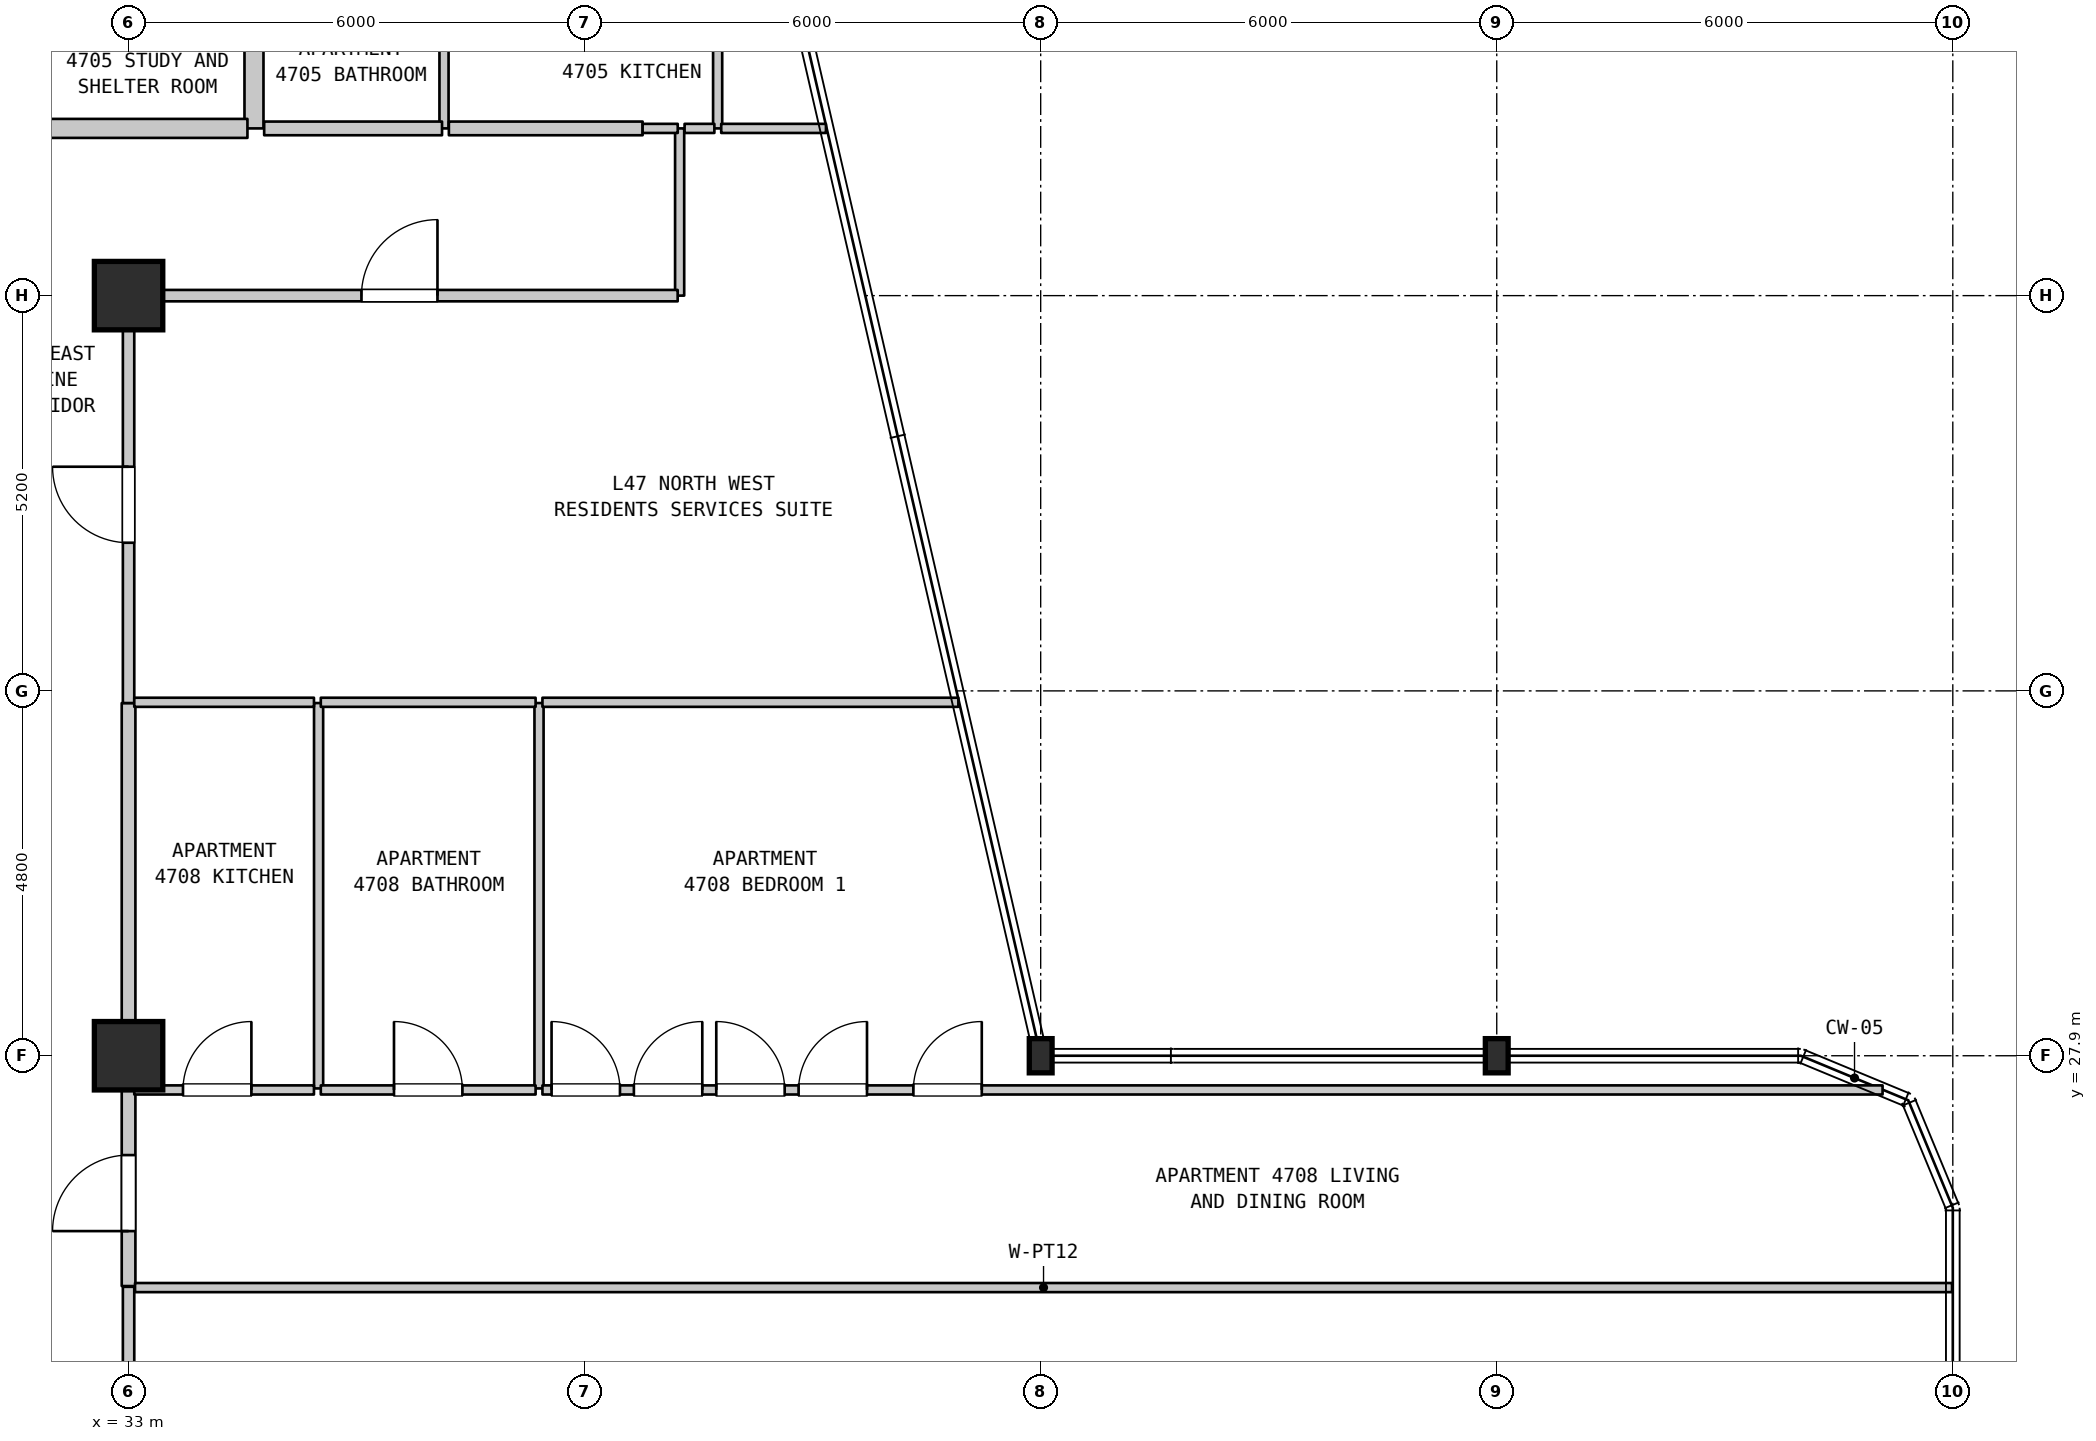
"""IFC4 building model, lengths in metres.
Left out: names, types, materials, properties, quantities, classifications, styles, units other than length and angle.
Written with IfcOpenShell. Run it as: python <this file> out.ifc"""

import sys

from ifc_helpers import new_model, si_unit, direction, frame, frame_2d, origin, origin_2d, place, context, subcontext, project, spatial, rectangle, i_section, extrude, element, fill, save


model = new_model("IFC4")
c1 = context("Model", 3, precision=1e-05, world=origin(), true_north=direction((0.0, 1.0)))
c2 = subcontext(c1, "Body", "Model", "MODEL_VIEW")
j1 = project(units=[si_unit("LENGTHUNIT", "METRE"), si_unit("PLANEANGLEUNIT", "RADIAN")], contexts=[c1])
p1 = place(None, origin())
s1 = spatial("IfcSite", under=j1, at=p1, CompositionType="ELEMENT")
p2 = place(p1, origin())
s2 = spatial("IfcBuilding", under=s1, at=p2, CompositionType="ELEMENT")
p3 = place(p2, frame((0.0, 0.0, 192.1)))
s3 = spatial("IfcBuildingStorey", under=s2, at=p3, CompositionType="ELEMENT", Elevation=192.1)
for number, where, z_axis, x_axis in (
    (1, (33.0, 27.9, 0.0), (0.0, 0.0, 1.0), (1.0, 0.0, 0.0)),
    (2, (33.0, 37.9, 0.0), (0.0, 0.0, 1.0), (1.0, 0.0, 0.0)),
):
    element("IfcColumn", number, at=place(p3, frame(where, z_axis=z_axis, x_axis=x_axis)), inside=s3, PredefinedType="COLUMN", context=c2, shape_type="SweptSolid", body=[
        extrude(rectangle(XDim=0.9, YDim=0.9, at=origin_2d()), origin(), (0.0, 0.0, 1.0), 3.7),
    ])
for number, where, z_axis, x_axis in (
    (3, (45.0, 27.9, 0.0), (0.0, 0.0, 1.0), (1.0, 0.0, 0.0)),
    (4, (51.0, 27.9, 0.0), (0.0, 0.0, 1.0), (1.0, 0.0, 0.0)),
):
    element("IfcColumn", number, at=place(p3, frame(where, z_axis=z_axis, x_axis=x_axis)), inside=s3, PredefinedType="COLUMN", context=c2, shape_type="SweptSolid", body=[
        extrude(i_section(OverallWidth=0.3, OverallDepth=0.45, WebThickness=0.014, FlangeThickness=0.026, FilletRadius=0.027, at=origin_2d()), origin(), (0.0, 0.0, 1.0), 3.7),
    ])
p4 = place(p3, frame((33.0, 19.51, 0.0), z_axis=(0.0, 0.0, 1.0), x_axis=(0.0, 1.0, 0.0)))
e5 = element("IfcWall", 5, at=p4, inside=s3, PredefinedType="STANDARD", context=c2, shape_type="SweptSolid", body=[
    extrude(rectangle(XDim=5.35, YDim=0.15, at=frame_2d((2.675, 0.0))), origin(), (0.0, 0.0, 1.0), 2.99),
])
p5 = place(p4, frame((1.534, 0.0, 0.0)))
e6 = element("IfcOpeningElement", 6, at=p5, cuts=e5, PredefinedType="OPENING", context=c2, shape_type="SweptSolid", body=[
    extrude(rectangle(XDim=1.0, YDim=2.15, at=frame_2d((0.5, 1.075))), frame((0.0, 0.085, 0.0), z_axis=(0.0, -1.0, 0.0), x_axis=(1.0, 0.0, 0.0)), (0.0, 0.0, 1.0), 0.17),
])
p6 = place(p3, frame((33.0, 24.87, 0.0), z_axis=(0.0, 0.0, 1.0), x_axis=(0.0, 1.0, 0.0)))
e7 = element("IfcWall", 7, at=p6, inside=s3, PredefinedType="STANDARD", context=c2, shape_type="SweptSolid", body=[
    extrude(rectangle(XDim=2.6, YDim=0.18, at=frame_2d((1.3, 0.0))), origin(), (0.0, 0.0, 1.0), 2.99),
])
p7 = place(p6, frame((0.723, 0.0, 0.0)))
e8 = element("IfcOpeningElement", 8, at=p7, cuts=e7, PredefinedType="OPENING", context=c2, shape_type="SweptSolid", body=[
    extrude(rectangle(XDim=1.0, YDim=2.15, at=frame_2d((0.5, 1.075))), frame((0.0, 0.1, 0.0), z_axis=(0.0, -1.0, 0.0), x_axis=(1.0, 0.0, 0.0)), (0.0, 0.0, 1.0), 0.2),
])
p8 = place(p3, frame((33.0, 27.47, 0.0), z_axis=(0.0, 0.0, 1.0), x_axis=(0.0, 1.0, 0.0)))
e9 = element("IfcWall", 9, at=p8, inside=s3, PredefinedType="STANDARD", context=c2, shape_type="SweptSolid", body=[
    extrude(rectangle(XDim=5.07, YDim=0.18, at=frame_2d((2.535, 0.0))), origin(), (0.0, 0.0, 1.0), 2.89),
])
p9 = place(p3, frame((33.0, 32.54, 0.0), z_axis=(0.0, 0.0, 1.0), x_axis=(0.0, 1.0, 0.0)))
e10 = element("IfcWall", 10, at=p9, inside=s3, PredefinedType="STANDARD", context=c2, shape_type="SweptSolid", body=[
    extrude(rectangle(XDim=5.36, YDim=0.15, at=frame_2d((2.68, 0.0))), origin(), (0.0, 0.0, 1.0), 2.89),
])
p10 = place(p9, frame((2.109, 0.0, 0.0)))
e11 = element("IfcOpeningElement", 11, at=p10, cuts=e10, PredefinedType="OPENING", context=c2, shape_type="SweptSolid", body=[
    extrude(rectangle(XDim=1.0, YDim=2.15, at=frame_2d((0.5, 1.075))), frame((0.0, 0.085, 0.0), z_axis=(0.0, -1.0, 0.0), x_axis=(1.0, 0.0, 0.0)), (0.0, 0.0, 1.0), 0.17),
])
p11 = place(p3, frame((34.65, 40.1, 0.0), z_axis=(0.0, 0.0, 1.0), x_axis=(0.0, 1.0, 0.0)))
e12 = element("IfcWall", 12, at=p11, inside=s3, PredefinedType="STANDARD", context=c2, shape_type="SweptSolid", body=[
    extrude(rectangle(XDim=2.3, YDim=0.25, at=frame_2d((1.15, 0.0))), origin(), (0.0, 0.0, 1.0), 3.39),
])
p12 = place(p3, frame((35.5, 27.47, 0.0), z_axis=(0.0, 0.0, 1.0), x_axis=(0.0, 1.0, 0.0)))
e13 = element("IfcWall", 13, at=p12, inside=s3, PredefinedType="PARTITIONING", context=c2, shape_type="SweptSolid", body=[
    extrude(rectangle(XDim=5.07, YDim=0.12, at=frame_2d((2.535, 0.0))), origin(), (0.0, 0.0, 1.0), 3.39),
])
p13 = place(p3, frame((37.15, 40.1, 0.0), z_axis=(0.0, 0.0, 1.0), x_axis=(0.0, 1.0, 0.0)))
e14 = element("IfcWall", 14, at=p13, inside=s3, PredefinedType="PARTITIONING", context=c2, shape_type="SweptSolid", body=[
    extrude(rectangle(XDim=2.3, YDim=0.12, at=frame_2d((1.15, 0.0))), origin(), (0.0, 0.0, 1.0), 3.39),
])
p14 = place(p3, frame((38.4, 27.47, 0.0), z_axis=(0.0, 0.0, 1.0), x_axis=(0.0, 1.0, 0.0)))
e15 = element("IfcWall", 15, at=p14, inside=s3, PredefinedType="PARTITIONING", context=c2, shape_type="SweptSolid", body=[
    extrude(rectangle(XDim=5.07, YDim=0.12, at=frame_2d((2.535, 0.0))), origin(), (0.0, 0.0, 1.0), 3.39),
])
p15 = place(p3, frame((40.25, 37.9, 0.0), z_axis=(0.0, 0.0, 1.0), x_axis=(0.0, 1.0, 0.0)))
e16 = element("IfcWall", 16, at=p15, inside=s3, PredefinedType="PARTITIONING", context=c2, shape_type="SweptSolid", body=[
    extrude(rectangle(XDim=2.2, YDim=0.12, at=frame_2d((1.1, 0.0))), origin(), (0.0, 0.0, 1.0), 3.39),
])
p16 = place(p3, frame((40.75, 40.1, 0.0), z_axis=(0.0, 0.0, 1.0), x_axis=(0.0, 1.0, 0.0)))
e17 = element("IfcWall", 17, at=p16, inside=s3, PredefinedType="PARTITIONING", context=c2, shape_type="SweptSolid", body=[
    extrude(rectangle(XDim=2.3, YDim=0.12, at=frame_2d((1.15, 0.0))), origin(), (0.0, 0.0, 1.0), 3.39),
])
p17 = place(p3, frame((33.085, 24.85, 0.0), z_axis=(0.0, 0.0, 1.0), x_axis=(1.0, 0.0, 0.0)))
e18 = element("IfcWall", 18, at=p17, inside=s3, PredefinedType="PARTITIONING", context=c2, shape_type="SweptSolid", body=[
    extrude(rectangle(XDim=23.905, YDim=0.12, at=frame_2d((11.953, 0.0))), origin(), (0.0, 0.0, 1.0), 3.39),
])
p18 = place(p3, frame((33.075, 27.45, 0.0), z_axis=(0.0, 0.0, 1.0), x_axis=(1.0, 0.0, 0.0)))
e19 = element("IfcWall", 19, at=p18, inside=s3, PredefinedType="PARTITIONING", context=c2, shape_type="SweptSolid", body=[
    extrude(rectangle(XDim=2.364, YDim=0.12, at=frame_2d((1.182, 0.0))), origin(), (0.0, 0.0, 1.0), 3.39),
])
p19 = place(p18, frame((0.641, 0.0, 0.0)))
e20 = element("IfcOpeningElement", 20, at=p19, cuts=e19, PredefinedType="OPENING", context=c2, shape_type="SweptSolid", body=[
    extrude(rectangle(XDim=0.9, YDim=2.15, at=frame_2d((0.45, 1.075))), frame((0.0, 0.07, 0.0), z_axis=(0.0, -1.0, 0.0), x_axis=(1.0, 0.0, 0.0)), (0.0, 0.0, 1.0), 0.14),
])
p20 = place(p3, frame((35.529, 27.45, 0.0), z_axis=(0.0, 0.0, 1.0), x_axis=(1.0, 0.0, 0.0)))
e21 = element("IfcWall", 21, at=p20, inside=s3, PredefinedType="PARTITIONING", context=c2, shape_type="SweptSolid", body=[
    extrude(rectangle(XDim=2.826, YDim=0.12, at=frame_2d((1.413, 0.0))), origin(), (0.0, 0.0, 1.0), 3.39),
])
p21 = place(p20, frame((0.963, 0.0, 0.0)))
e22 = element("IfcOpeningElement", 22, at=p21, cuts=e21, PredefinedType="OPENING", context=c2, shape_type="SweptSolid", body=[
    extrude(rectangle(XDim=0.9, YDim=2.1, at=frame_2d((0.45, 1.05))), frame((0.0, 0.07, 0.0), z_axis=(0.0, -1.0, 0.0), x_axis=(1.0, 0.0, 0.0)), (0.0, 0.0, 1.0), 0.14),
])
p22 = place(p3, frame((38.445, 27.45, 0.0), z_axis=(0.0, 0.0, 1.0), x_axis=(1.0, 0.0, 0.0)))
e23 = element("IfcWall", 23, at=p22, inside=s3, PredefinedType="PARTITIONING", context=c2, shape_type="SweptSolid", body=[
    extrude(rectangle(XDim=17.631, YDim=0.12, at=frame_2d((8.815, 0.0))), origin(), (0.0, 0.0, 1.0), 3.39),
])
p23 = place(p22, frame((4.88, 0.0, 0.0)))
e24 = element("IfcOpeningElement", 24, at=p23, cuts=e23, PredefinedType="OPENING", context=c2, shape_type="SweptSolid", body=[
    extrude(rectangle(XDim=0.9, YDim=2.15, at=frame_2d((0.45, 1.075))), frame((0.0, 0.07, 0.0), z_axis=(0.0, -1.0, 0.0), x_axis=(1.0, 0.0, 0.0)), (0.0, 0.0, 1.0), 0.14),
])
p24 = place(p22, frame((0.12, 0.0, 0.0)))
e25 = element("IfcOpeningElement", 25, at=p24, cuts=e23, PredefinedType="OPENING", context=c2, shape_type="SweptSolid", body=[
    extrude(rectangle(XDim=0.9, YDim=2.15, at=frame_2d((0.45, 1.075))), frame((0.0, 0.07, 0.0), z_axis=(0.0, -1.0, 0.0), x_axis=(1.0, 0.0, 0.0)), (0.0, 0.0, 1.0), 0.14),
])
p25 = place(p22, frame((1.203, 0.0, 0.0)))
e26 = element("IfcOpeningElement", 26, at=p25, cuts=e23, PredefinedType="OPENING", context=c2, shape_type="SweptSolid", body=[
    extrude(rectangle(XDim=0.9, YDim=2.15, at=frame_2d((0.45, 1.075))), frame((0.0, 0.07, 0.0), z_axis=(0.0, -1.0, 0.0), x_axis=(1.0, 0.0, 0.0)), (0.0, 0.0, 1.0), 0.14),
])
p26 = place(p22, frame((2.287, 0.0, 0.0)))
e27 = element("IfcOpeningElement", 27, at=p26, cuts=e23, PredefinedType="OPENING", context=c2, shape_type="SweptSolid", body=[
    extrude(rectangle(XDim=0.9, YDim=2.15, at=frame_2d((0.45, 1.075))), frame((0.0, 0.07, 0.0), z_axis=(0.0, -1.0, 0.0), x_axis=(1.0, 0.0, 0.0)), (0.0, 0.0, 1.0), 0.14),
])
p27 = place(p22, frame((3.37, 0.0, 0.0)))
e28 = element("IfcOpeningElement", 28, at=p27, cuts=e23, PredefinedType="OPENING", context=c2, shape_type="SweptSolid", body=[
    extrude(rectangle(XDim=0.9, YDim=2.15, at=frame_2d((0.45, 1.075))), frame((0.0, 0.07, 0.0), z_axis=(0.0, -1.0, 0.0), x_axis=(1.0, 0.0, 0.0)), (0.0, 0.0, 1.0), 0.14),
])
p28 = place(p3, frame((33.075, 32.55, 0.0), z_axis=(0.0, 0.0, 1.0), x_axis=(1.0, 0.0, 0.0)))
e29 = element("IfcWall", 29, at=p28, inside=s3, PredefinedType="PARTITIONING", context=c2, shape_type="SweptSolid", body=[
    extrude(rectangle(XDim=2.364, YDim=0.12, at=frame_2d((1.182, 0.0))), origin(), (0.0, 0.0, 1.0), 3.39),
])
p29 = place(p3, frame((35.529, 32.55, 0.0), z_axis=(0.0, 0.0, 1.0), x_axis=(1.0, 0.0, 0.0)))
e30 = element("IfcWall", 30, at=p29, inside=s3, PredefinedType="PARTITIONING", context=c2, shape_type="SweptSolid", body=[
    extrude(rectangle(XDim=2.826, YDim=0.12, at=frame_2d((1.413, 0.0))), origin(), (0.0, 0.0, 1.0), 3.39),
])
p30 = place(p3, frame((38.445, 32.55, 0.0), z_axis=(0.0, 0.0, 1.0), x_axis=(1.0, 0.0, 0.0)))
e31 = element("IfcWall", 31, at=p30, inside=s3, PredefinedType="PARTITIONING", context=c2, shape_type="SweptSolid", body=[
    extrude(rectangle(XDim=5.472, YDim=0.12, at=frame_2d((2.736, 0.0))), origin(), (0.0, 0.0, 1.0), 3.39),
])
p31 = place(p3, frame((33.06, 37.9, 0.0), z_axis=(0.0, 0.0, 1.0), x_axis=(1.0, 0.0, 0.0)))
e32 = element("IfcWall", 32, at=p31, inside=s3, PredefinedType="STANDARD", context=c2, shape_type="SweptSolid", body=[
    extrude(rectangle(XDim=7.164, YDim=0.15, at=frame_2d((3.582, 0.0))), origin(), (0.0, 0.0, 1.0), 3.39),
])
p32 = place(p31, frame((3.004, 0.0, 0.0)))
e33 = element("IfcOpeningElement", 33, at=p32, cuts=e32, PredefinedType="OPENING", context=c2, shape_type="SweptSolid", body=[
    extrude(rectangle(XDim=1.0, YDim=2.15, at=frame_2d((0.5, 1.075))), frame((0.0, 0.085, 0.0), z_axis=(0.0, -1.0, 0.0), x_axis=(1.0, 0.0, 0.0)), (0.0, 0.0, 1.0), 0.17),
])
p33 = place(p3, frame((31.95, 40.1, 0.0), z_axis=(0.0, 0.0, 1.0), x_axis=(1.0, 0.0, 0.0)))
e34 = element("IfcWall", 34, at=p33, inside=s3, PredefinedType="STANDARD", context=c2, shape_type="SweptSolid", body=[
    extrude(rectangle(XDim=2.614, YDim=0.25, at=frame_2d((1.307, 0.0))), origin(), (0.0, 0.0, 1.0), 3.39),
])
p34 = place(p3, frame((34.784, 40.1, 0.0), z_axis=(0.0, 0.0, 1.0), x_axis=(1.0, 0.0, 0.0)))
e35 = element("IfcWall", 35, at=p34, inside=s3, PredefinedType="STANDARD", context=c2, shape_type="SweptSolid", body=[
    extrude(rectangle(XDim=2.34, YDim=0.18, at=frame_2d((1.17, 0.0))), origin(), (0.0, 0.0, 1.0), 3.39),
])
p35 = place(p3, frame((37.214, 40.1, 0.0), z_axis=(0.0, 0.0, 1.0), x_axis=(1.0, 0.0, 0.0)))
e36 = element("IfcWall", 36, at=p35, inside=s3, PredefinedType="STANDARD", context=c2, shape_type="SweptSolid", body=[
    extrude(rectangle(XDim=2.549, YDim=0.18, at=frame_2d((1.274, 0.0))), origin(), (0.0, 0.0, 1.0), 3.39),
])
p36 = place(p3, frame((39.763, 40.1, 0.0), z_axis=(0.0, 0.0, 1.0), x_axis=(1.0, 0.0, 0.0)))
e37 = element("IfcWall", 37, at=p36, inside=s3, PredefinedType="PARTITIONING", context=c2, shape_type="SweptSolid", body=[
    extrude(rectangle(XDim=0.462, YDim=0.12, at=frame_2d((0.231, 0.0))), origin(), (0.0, 0.0, 1.0), 3.39),
])
p37 = place(p3, frame((40.315, 40.1, 0.0), z_axis=(0.0, 0.0, 1.0), x_axis=(1.0, 0.0, 0.0)))
e38 = element("IfcWall", 38, at=p37, inside=s3, PredefinedType="PARTITIONING", context=c2, shape_type="SweptSolid", body=[
    extrude(rectangle(XDim=0.392, YDim=0.12, at=frame_2d((0.196, 0.0))), origin(), (0.0, 0.0, 1.0), 3.39),
])
p38 = place(p3, frame((40.797, 40.1, 0.0), z_axis=(0.0, 0.0, 1.0), x_axis=(1.0, 0.0, 0.0)))
e39 = element("IfcWall", 39, at=p38, inside=s3, PredefinedType="PARTITIONING", context=c2, shape_type="SweptSolid", body=[
    extrude(rectangle(XDim=1.378, YDim=0.12, at=frame_2d((0.689, 0.0))), origin(), (0.0, 0.0, 1.0), 3.39),
])
p39 = place(p7, origin())
e40 = element("IfcDoor", 40, at=p39, inside=s3, OperationType="SINGLE_SWING_LEFT", PredefinedType="DOOR", context=c2, shape_type="SweptSolid", body=[
    extrude(rectangle(XDim=1.0, YDim=2.15, at=frame_2d((0.5, 1.075))), frame((0.0, 0.025, 0.0), z_axis=(0.0, -1.0, 0.0), x_axis=(1.0, 0.0, 0.0)), (0.0, 0.0, 1.0), 0.05),
])
fill(e8, e40)
p40 = place(p10, origin())
e41 = element("IfcDoor", 41, at=p40, inside=s3, OperationType="SINGLE_SWING_RIGHT", PredefinedType="DOOR", context=c2, shape_type="SweptSolid", body=[
    extrude(rectangle(XDim=1.0, YDim=2.15, at=frame_2d((0.5, 1.075))), frame((0.0, 0.025, 0.0), z_axis=(0.0, -1.0, 0.0), x_axis=(1.0, 0.0, 0.0)), (0.0, 0.0, 1.0), 0.05),
])
fill(e11, e41)
p41 = place(p19, origin())
e42 = element("IfcDoor", 42, at=p41, inside=s3, OperationType="SINGLE_SWING_RIGHT", PredefinedType="DOOR", context=c2, shape_type="SweptSolid", body=[
    extrude(rectangle(XDim=0.9, YDim=2.15, at=frame_2d((0.45, 1.075))), frame((0.0, 0.025, 0.0), z_axis=(0.0, -1.0, 0.0), x_axis=(1.0, 0.0, 0.0)), (0.0, 0.0, 1.0), 0.05),
])
fill(e20, e42)
p42 = place(p21, origin())
e43 = element("IfcDoor", 43, at=p42, inside=s3, OperationType="SINGLE_SWING_LEFT", PredefinedType="DOOR", context=c2, shape_type="SweptSolid", body=[
    extrude(rectangle(XDim=0.9, YDim=2.1, at=frame_2d((0.45, 1.05))), frame((0.0, 0.025, 0.0), z_axis=(0.0, -1.0, 0.0), x_axis=(1.0, 0.0, 0.0)), (0.0, 0.0, 1.0), 0.05),
])
fill(e22, e43)
p43 = place(p23, origin())
e44 = element("IfcDoor", 44, at=p43, inside=s3, OperationType="SINGLE_SWING_RIGHT", PredefinedType="DOOR", context=c2, shape_type="SweptSolid", body=[
    extrude(rectangle(XDim=0.9, YDim=2.15, at=frame_2d((0.45, 1.075))), frame((0.0, 0.025, 0.0), z_axis=(0.0, -1.0, 0.0), x_axis=(1.0, 0.0, 0.0)), (0.0, 0.0, 1.0), 0.05),
])
fill(e24, e44)
p44 = place(p24, origin())
e45 = element("IfcDoor", 45, at=p44, inside=s3, OperationType="SINGLE_SWING_LEFT", PredefinedType="DOOR", context=c2, shape_type="SweptSolid", body=[
    extrude(rectangle(XDim=0.9, YDim=2.15, at=frame_2d((0.45, 1.075))), frame((0.0, 0.025, 0.0), z_axis=(0.0, -1.0, 0.0), x_axis=(1.0, 0.0, 0.0)), (0.0, 0.0, 1.0), 0.05),
])
fill(e25, e45)
p45 = place(p25, origin())
e46 = element("IfcDoor", 46, at=p45, inside=s3, OperationType="SINGLE_SWING_RIGHT", PredefinedType="DOOR", context=c2, shape_type="SweptSolid", body=[
    extrude(rectangle(XDim=0.9, YDim=2.15, at=frame_2d((0.45, 1.075))), frame((0.0, 0.025, 0.0), z_axis=(0.0, -1.0, 0.0), x_axis=(1.0, 0.0, 0.0)), (0.0, 0.0, 1.0), 0.05),
])
fill(e26, e46)
p46 = place(p26, origin())
e47 = element("IfcDoor", 47, at=p46, inside=s3, OperationType="SINGLE_SWING_LEFT", PredefinedType="DOOR", context=c2, shape_type="SweptSolid", body=[
    extrude(rectangle(XDim=0.9, YDim=2.15, at=frame_2d((0.45, 1.075))), frame((0.0, 0.025, 0.0), z_axis=(0.0, -1.0, 0.0), x_axis=(1.0, 0.0, 0.0)), (0.0, 0.0, 1.0), 0.05),
])
fill(e27, e47)
p47 = place(p27, origin())
e48 = element("IfcDoor", 48, at=p47, inside=s3, OperationType="SINGLE_SWING_RIGHT", PredefinedType="DOOR", context=c2, shape_type="SweptSolid", body=[
    extrude(rectangle(XDim=0.9, YDim=2.15, at=frame_2d((0.45, 1.075))), frame((0.0, 0.025, 0.0), z_axis=(0.0, -1.0, 0.0), x_axis=(1.0, 0.0, 0.0)), (0.0, 0.0, 1.0), 0.05),
])
fill(e28, e48)
p48 = place(p32, origin())
e49 = element("IfcDoor", 49, at=p48, inside=s3, OperationType="SINGLE_SWING_RIGHT", PredefinedType="DOOR", context=c2, shape_type="SweptSolid", body=[
    extrude(rectangle(XDim=1.0, YDim=2.15, at=frame_2d((0.5, 1.075))), frame((0.0, 0.025, 0.0), z_axis=(0.0, -1.0, 0.0), x_axis=(1.0, 0.0, 0.0)), (0.0, 0.0, 1.0), 0.05),
])
fill(e33, e49)
save(model, sys.argv[1])
